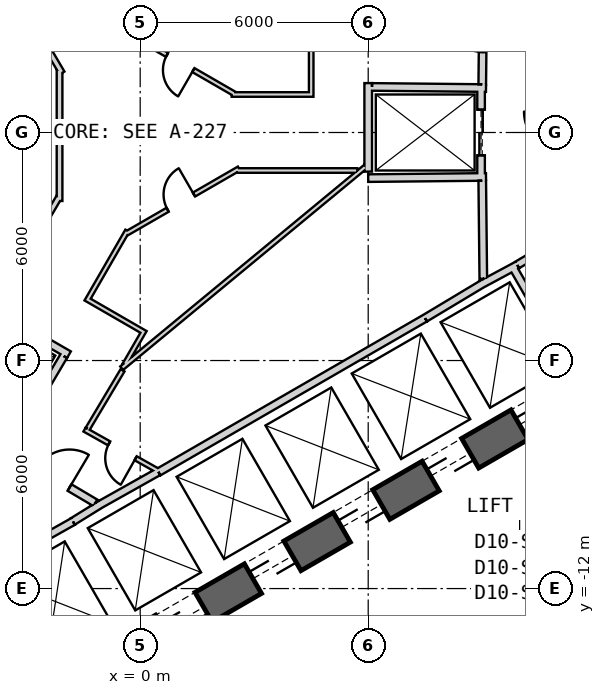
"""IFC4 building model, lengths in metres.
Left out: names, types, materials, properties, quantities, classifications, styles, units other than length and angle.
Written with IfcOpenShell. Run it as: python <this file> out.ifc"""

import sys

from ifc_helpers import new_model, si_unit, direction, frame, frame_2d, origin, place, context, subcontext, project, spatial, rectangle, extrude, element, fill, save


model = new_model("IFC4")
c1 = context("Model", 3, precision=1e-05, world=origin(), true_north=direction((0.0, 1.0)))
c2 = subcontext(c1, "Body", "Model", "MODEL_VIEW")
j1 = project(units=[si_unit("LENGTHUNIT", "METRE"), si_unit("PLANEANGLEUNIT", "RADIAN")], contexts=[c1])
p1 = place(None, origin())
s1 = spatial("IfcSite", under=j1, at=p1, CompositionType="ELEMENT")
p2 = place(p1, origin())
s2 = spatial("IfcBuilding", under=s1, at=p2, CompositionType="ELEMENT")
p3 = place(p2, frame((0.0, 0.0, 241.2)))
s3 = spatial("IfcBuildingStorey", under=s2, at=p3, CompositionType="ELEMENT", Elevation=241.2)
p4 = place(p3, frame((19.475, 2.208, 0.0), z_axis=(0.0, 0.0, 1.0), x_axis=(-0.866028369851, 0.499994862586, 0.0)))
e1 = element("IfcWall", 1, at=p4, inside=s3, PredefinedType="SHEAR", context=c2, shape_type="SweptSolid", body=[
    extrude(rectangle(XDim=31.523, YDim=0.9, at=frame_2d((15.762, 0.0))), origin(), (0.0, 0.0, 1.0), 4.0),
])
p5 = place(p4, frame((7.062, 0.0, 0.0)))
e2 = element("IfcOpeningElement", 2, at=p5, cuts=e1, PredefinedType="OPENING", context=c2, shape_type="SweptSolid", body=[
    extrude(rectangle(XDim=1.2, YDim=2.4, at=frame_2d((0.6, 1.2))), frame((0.0, 0.46, 0.0), z_axis=(0.0, -1.0, 0.0), x_axis=(1.0, 0.0, 0.0)), (0.0, 0.0, 1.0), 0.92),
])
p6 = place(p4, frame((3.612, 0.0, 0.0)))
e3 = element("IfcOpeningElement", 3, at=p6, cuts=e1, PredefinedType="OPENING", context=c2, shape_type="SweptSolid", body=[
    extrude(rectangle(XDim=1.2, YDim=2.4, at=frame_2d((0.6, 1.2))), frame((0.0, 0.46, 0.0), z_axis=(0.0, -1.0, 0.0), x_axis=(1.0, 0.0, 0.0)), (0.0, 0.0, 1.0), 0.92),
])
p7 = place(p4, frame((26.712, 0.0, 0.0)))
e4 = element("IfcOpeningElement", 4, at=p7, cuts=e1, PredefinedType="OPENING", context=c2, shape_type="SweptSolid", body=[
    extrude(rectangle(XDim=1.2, YDim=2.4, at=frame_2d((0.6, 1.2))), frame((0.0, 0.46, 0.0), z_axis=(0.0, -1.0, 0.0), x_axis=(1.0, 0.0, 0.0)), (0.0, 0.0, 1.0), 0.92),
])
p8 = place(p3, frame((-7.825, -17.97, 0.0), z_axis=(0.0, 0.0, 1.0), x_axis=(0.866028369851, 0.499994862586, 0.0)))
e5 = element("IfcWall", 5, at=p8, inside=s3, PredefinedType="SHEAR", context=c2, shape_type="SweptSolid", body=[
    extrude(rectangle(XDim=31.523, YDim=0.9, at=frame_2d((15.762, 0.0))), origin(), (0.0, 0.0, 1.0), 4.0),
])
p9 = place(p8, frame((7.062, 0.0, 0.0)))
e6 = element("IfcOpeningElement", 6, at=p9, cuts=e5, PredefinedType="OPENING", context=c2, shape_type="SweptSolid", body=[
    extrude(rectangle(XDim=1.2, YDim=2.4, at=frame_2d((0.6, 1.2))), frame((0.0, 0.46, 0.0), z_axis=(0.0, -1.0, 0.0), x_axis=(1.0, 0.0, 0.0)), (0.0, 0.0, 1.0), 0.92),
])
p10 = place(p8, frame((9.762, 0.0, 0.0)))
e7 = element("IfcOpeningElement", 7, at=p10, cuts=e5, PredefinedType="OPENING", context=c2, shape_type="SweptSolid", body=[
    extrude(rectangle(XDim=1.2, YDim=2.4, at=frame_2d((0.6, 1.2))), frame((0.0, 0.46, 0.0), z_axis=(0.0, -1.0, 0.0), x_axis=(1.0, 0.0, 0.0)), (0.0, 0.0, 1.0), 0.92),
])
p11 = place(p8, frame((12.462, 0.0, 0.0)))
e8 = element("IfcOpeningElement", 8, at=p11, cuts=e5, PredefinedType="OPENING", context=c2, shape_type="SweptSolid", body=[
    extrude(rectangle(XDim=1.2, YDim=2.4, at=frame_2d((0.6, 1.2))), frame((0.0, 0.46, 0.0), z_axis=(0.0, -1.0, 0.0), x_axis=(1.0, 0.0, 0.0)), (0.0, 0.0, 1.0), 0.92),
])
p12 = place(p8, frame((15.162, 0.0, 0.0)))
e9 = element("IfcOpeningElement", 9, at=p12, cuts=e5, PredefinedType="OPENING", context=c2, shape_type="SweptSolid", body=[
    extrude(rectangle(XDim=1.2, YDim=2.4, at=frame_2d((0.6, 1.2))), frame((0.0, 0.46, 0.0), z_axis=(0.0, -1.0, 0.0), x_axis=(1.0, 0.0, 0.0)), (0.0, 0.0, 1.0), 0.92),
])
p13 = place(p8, frame((17.862, 0.0, 0.0)))
e10 = element("IfcOpeningElement", 10, at=p13, cuts=e5, PredefinedType="OPENING", context=c2, shape_type="SweptSolid", body=[
    extrude(rectangle(XDim=1.2, YDim=2.4, at=frame_2d((0.6, 1.2))), frame((0.0, 0.46, 0.0), z_axis=(0.0, -1.0, 0.0), x_axis=(1.0, 0.0, 0.0)), (0.0, 0.0, 1.0), 0.92),
])
p14 = place(p8, frame((20.562, 0.0, 0.0)))
e11 = element("IfcOpeningElement", 11, at=p14, cuts=e5, PredefinedType="OPENING", context=c2, shape_type="SweptSolid", body=[
    extrude(rectangle(XDim=1.2, YDim=2.4, at=frame_2d((0.6, 1.2))), frame((0.0, 0.46, 0.0), z_axis=(0.0, -1.0, 0.0), x_axis=(1.0, 0.0, 0.0)), (0.0, 0.0, 1.0), 0.92),
])
p15 = place(p8, frame((26.712, 0.0, 0.0)))
e12 = element("IfcOpeningElement", 12, at=p15, cuts=e5, PredefinedType="OPENING", context=c2, shape_type="SweptSolid", body=[
    extrude(rectangle(XDim=1.2, YDim=2.4, at=frame_2d((0.6, 1.2))), frame((0.0, 0.46, 0.0), z_axis=(0.0, -1.0, 0.0), x_axis=(1.0, 0.0, 0.0)), (0.0, 0.0, 1.0), 0.92),
])
p16 = place(p8, frame((3.612, 0.0, 0.0)))
e13 = element("IfcOpeningElement", 13, at=p16, cuts=e5, PredefinedType="OPENING", context=c2, shape_type="SweptSolid", body=[
    extrude(rectangle(XDim=1.2, YDim=2.4, at=frame_2d((0.6, 1.2))), frame((0.0, 0.46, 0.0), z_axis=(0.0, -1.0, 0.0), x_axis=(1.0, 0.0, 0.0)), (0.0, 0.0, 1.0), 0.92),
])
p17 = place(p3, frame((0.483, -8.936, 0.0), z_axis=(0.0, 0.0, 1.0), x_axis=(0.866030989016, 0.499990325971, 0.0)))
e14 = element("IfcWall", 14, at=p17, inside=s3, PredefinedType="PLUMBINGWALL", context=c2, shape_type="SweptSolid", body=[
    extrude(rectangle(XDim=8.1, YDim=0.2, at=frame_2d((4.05, 0.0))), origin(), (0.0, 0.0, 1.0), 3.7),
])
p18 = place(p3, frame((9.795, -3.525, 0.0), z_axis=(0.0, 0.0, 1.0), x_axis=(0.499984717929, -0.866034226713, 0.0)))
e15 = element("IfcWall", 15, at=p18, inside=s3, PredefinedType="PLUMBINGWALL", context=c2, shape_type="SweptSolid", body=[
    extrude(rectangle(XDim=3.25, YDim=0.2, at=frame_2d((1.625, 0.0))), origin(), (0.0, 0.0, 1.0), 3.7),
])
p19 = place(p3, frame((8.974, -3.999, 0.0), z_axis=(0.0, 0.0, 1.0), x_axis=(0.880907015104, 0.473289373154, 0.0)))
e16 = element("IfcWall", 16, at=p19, inside=s3, PredefinedType="PLUMBINGWALL", context=c2, shape_type="SweptSolid", body=[
    extrude(rectangle(XDim=1.078, YDim=0.2, at=frame_2d((0.539, 0.0))), origin(), (0.0, 0.0, 1.0), 3.7),
])
p20 = place(p3, frame((7.497, -4.886, 0.0), z_axis=(0.0, 0.0, 1.0), x_axis=(0.857516281273, 0.51445682749, 0.0)))
e17 = element("IfcWall", 17, at=p20, inside=s3, PredefinedType="PLUMBINGWALL", context=c2, shape_type="SweptSolid", body=[
    extrude(rectangle(XDim=1.845, YDim=0.2, at=frame_2d((0.922, 0.0))), origin(), (0.0, 0.0, 1.0), 3.7),
])
p21 = place(p3, frame((-1.769, -10.237, 0.0), z_axis=(0.0, 0.0, 1.0), x_axis=(-0.871534483978, -0.490334215854, 0.0)))
e18 = element("IfcWall", 18, at=p21, inside=s3, PredefinedType="PLUMBINGWALL", context=c2, shape_type="SweptSolid", body=[
    extrude(rectangle(XDim=2.7, YDim=0.2, at=frame_2d((1.35, 0.0))), origin(), (0.0, 0.0, 1.0), 3.7),
])
p22 = place(p3, frame((-1.024, -9.771, 0.0), z_axis=(0.0, 0.0, 1.0), x_axis=(-0.850348075135, -0.526220629693, 0.0)))
e19 = element("IfcWall", 19, at=p22, inside=s3, PredefinedType="PLUMBINGWALL", context=c2, shape_type="SweptSolid", body=[
    extrude(rectangle(XDim=0.878, YDim=0.2, at=frame_2d((0.439, 0.0))), origin(), (0.0, 0.0, 1.0), 3.7),
])
p23 = place(p3, frame((-1.13, -9.832, 0.0), z_axis=(0.0, 0.0, 1.0), x_axis=(0.871988740738, 0.489525929882, 0.0)))
e20 = element("IfcWall", 20, at=p23, inside=s3, PredefinedType="PLUMBINGWALL", context=c2, shape_type="SweptSolid", body=[
    extrude(rectangle(XDim=1.845, YDim=0.2, at=frame_2d((0.922, 0.0))), origin(), (0.0, 0.0, 1.0), 3.7),
])
p24 = place(p3, frame((8.97, 1.2, 0.0), z_axis=(0.0, 0.0, 1.0), x_axis=(0.0, -1.0, 0.0)))
e21 = element("IfcWall", 21, at=p24, inside=s3, PredefinedType="PLUMBINGWALL", context=c2, shape_type="SweptSolid", body=[
    extrude(rectangle(XDim=2.4, YDim=0.2, at=frame_2d((1.2, 0.0))), origin(), (0.0, 0.0, 1.0), 3.7),
])
p25 = place(p24, frame((0.6, 0.0, 0.0)))
e22 = element("IfcOpeningElement", 22, at=p25, cuts=e21, PredefinedType="OPENING", context=c2, shape_type="SweptSolid", body=[
    extrude(rectangle(XDim=1.2, YDim=2.4, at=frame_2d((0.6, 1.2))), frame((0.0, 0.11, 0.0), z_axis=(0.0, -1.0, 0.0), x_axis=(1.0, 0.0, 0.0)), (0.0, 0.0, 1.0), 0.22),
])
p26 = place(p3, frame((9.1, -1.169, 0.0), z_axis=(0.0, 0.0, 1.0), x_axis=(-0.999949988, -0.010001074852, 0.0)))
e23 = element("IfcWall", 23, at=p26, inside=s3, PredefinedType="PLUMBINGWALL", context=c2, shape_type="SweptSolid", body=[
    extrude(rectangle(XDim=3.1, YDim=0.2, at=frame_2d((1.55, 0.0))), origin(), (0.0, 0.0, 1.0), 3.7),
])
p27 = place(p3, frame((6.0, -1.03, 0.0), z_axis=(0.0, 0.0, 1.0), x_axis=(0.0, 1.0, 0.0)))
e24 = element("IfcWall", 24, at=p27, inside=s3, PredefinedType="PLUMBINGWALL", context=c2, shape_type="SweptSolid", body=[
    extrude(rectangle(XDim=2.33, YDim=0.2, at=frame_2d((1.165, 0.0))), origin(), (0.0, 0.0, 1.0), 3.7),
])
p28 = place(p3, frame((9.1, 1.169, 0.0), z_axis=(0.0, 0.0, 1.0), x_axis=(-0.99994990606, 0.010009264196, 0.0)))
e25 = element("IfcWall", 25, at=p28, inside=s3, PredefinedType="PLUMBINGWALL", context=c2, shape_type="SweptSolid", body=[
    extrude(rectangle(XDim=3.0, YDim=0.2, at=frame_2d((1.5, 0.0))), origin(), (0.0, 0.0, 1.0), 3.7),
])
p29 = place(p3, frame((-3.957, -4.644, 0.0), z_axis=(0.0, 0.0, 1.0), x_axis=(0.865991127953, -0.500059362782, 0.0)))
e26 = element("IfcWall", 26, at=p29, inside=s3, PredefinedType="PLUMBINGWALL", context=c2, shape_type="SweptSolid", body=[
    extrude(rectangle(XDim=2.405, YDim=0.2, at=frame_2d((1.202, 0.0))), origin(), (0.0, 0.0, 1.0), 3.7),
])
p30 = place(p3, frame((-2.012, -5.882, 0.0), z_axis=(0.0, 0.0, 1.0), x_axis=(-0.508619639323, -0.860991325447, 0.0)))
e27 = element("IfcWall", 27, at=p30, inside=s3, PredefinedType="PLUMBINGWALL", context=c2, shape_type="SweptSolid", body=[
    extrude(rectangle(XDim=3.0, YDim=0.2, at=frame_2d((1.5, 0.0))), origin(), (0.0, 0.0, 1.0), 3.7),
])
p31 = place(p3, frame((12.245, -2.109, 0.0), z_axis=(0.0, 0.0, 1.0), x_axis=(-0.860414880418, -0.509594185166, 0.0)))
e28 = element("IfcWall", 28, at=p31, inside=s3, PredefinedType="PARTITIONING", context=c2, shape_type="SweptSolid", body=[
    extrude(rectangle(XDim=2.7, YDim=0.2, at=frame_2d((1.35, 0.0))), origin(), (0.0, 0.0, 1.0), 3.7),
])
p32 = place(p3, frame((9.029, -3.851, 0.0), z_axis=(0.0, 0.0, 1.0), x_axis=(-0.010784614026, 0.999941844359, 0.0)))
e29 = element("IfcWall", 29, at=p32, inside=s3, PredefinedType="PARTITIONING", context=c2, shape_type="SweptSolid", body=[
    extrude(rectangle(XDim=2.581, YDim=0.2, at=frame_2d((1.291, 0.0))), origin(), (0.0, 0.0, 1.0), 3.7),
])
p33 = place(p3, frame((9.001, 1.27, 0.0), z_axis=(0.0, 0.0, 1.0), x_axis=(0.010723968736, 0.999942496594, 0.0)))
e30 = element("IfcWall", 30, at=p33, inside=s3, PredefinedType="PARTITIONING", context=c2, shape_type="SweptSolid", body=[
    extrude(rectangle(XDim=2.709, YDim=0.2, at=frame_2d((1.354, 0.0))), origin(), (0.0, 0.0, 1.0), 3.7),
])
p34 = place(p33, frame((0.848, 0.0, 0.0)))
e31 = element("IfcOpeningElement", 31, at=p34, cuts=e30, PredefinedType="OPENING", context=c2, shape_type="SweptSolid", body=[
    extrude(rectangle(XDim=1.0, YDim=2.1, at=frame_2d((0.5, 1.05))), frame((0.0, 0.11, 0.0), z_axis=(0.0, -1.0, 0.0), x_axis=(1.0, 0.0, 0.0)), (0.0, 0.0, 1.0), 0.22),
])
p35 = place(p3, frame((-3.401, -8.43, 0.0), z_axis=(0.0, 0.0, 1.0), x_axis=(0.860598681535, -0.509283721849, 0.0)))
e32 = element("IfcWall", 32, at=p35, inside=s3, PredefinedType="PARTITIONING", context=c2, shape_type="SweptSolid", body=[
    extrude(rectangle(XDim=2.581, YDim=0.2, at=frame_2d((1.291, 0.0))), origin(), (0.0, 0.0, 1.0), 3.7),
])
p36 = place(p35, frame((0.791, 0.0, 0.0)))
e33 = element("IfcOpeningElement", 33, at=p36, cuts=e32, PredefinedType="OPENING", context=c2, shape_type="SweptSolid", body=[
    extrude(rectangle(XDim=1.0, YDim=2.1, at=frame_2d((0.5, 1.05))), frame((0.0, 0.11, 0.0), z_axis=(0.0, -1.0, 0.0), x_axis=(1.0, 0.0, 0.0)), (0.0, 0.0, 1.0), 0.22),
])
p37 = place(p3, frame((-2.057, 1.565, 0.0), z_axis=(0.0, 0.0, 1.0), x_axis=(-0.507299271879, 0.861769951176, 0.0)))
e34 = element("IfcWall", 34, at=p37, inside=s3, PredefinedType="PLUMBINGWALL", context=c2, shape_type="SweptSolid", body=[
    extrude(rectangle(XDim=3.516, YDim=0.15, at=frame_2d((1.758, 0.0))), origin(), (0.0, 0.0, 1.0), 3.7),
])
p38 = place(p37, frame((1.422, 0.0, 0.0)))
e35 = element("IfcOpeningElement", 35, at=p38, cuts=e34, PredefinedType="OPENING", context=c2, shape_type="SweptSolid", body=[
    extrude(rectangle(XDim=0.8, YDim=2.1, at=frame_2d((0.4, 1.05))), frame((0.0, 0.085, 0.0), z_axis=(0.0, -1.0, 0.0), x_axis=(1.0, 0.0, 0.0)), (0.0, 0.0, 1.0), 0.17),
])
p39 = place(p3, frame((-2.122, -1.802, 0.0), z_axis=(0.0, 0.0, 1.0), x_axis=(0.0, 1.0, 0.0)))
e36 = element("IfcWall", 36, at=p39, inside=s3, PredefinedType="PLUMBINGWALL", context=c2, shape_type="SweptSolid", body=[
    extrude(rectangle(XDim=3.454, YDim=0.15, at=frame_2d((1.727, 0.0))), origin(), (0.0, 0.0, 1.0), 3.7),
])
p40 = place(p3, frame((-3.841, -4.595, 0.0), z_axis=(0.0, 0.0, 1.0), x_axis=(0.507318157939, 0.861758833216, 0.0)))
e37 = element("IfcWall", 37, at=p40, inside=s3, PredefinedType="PLUMBINGWALL", context=c2, shape_type="SweptSolid", body=[
    extrude(rectangle(XDim=3.365, YDim=0.15, at=frame_2d((1.682, 0.0))), origin(), (0.0, 0.0, 1.0), 3.7),
])
p41 = place(p3, frame((5.936, -0.894, 0.0), z_axis=(0.0, 0.0, 1.0), x_axis=(-0.770832870475, -0.637037428881, 0.0)))
e38 = element("IfcWall", 38, at=p41, inside=s3, PredefinedType="PARTITIONING", context=c2, shape_type="SweptSolid", body=[
    extrude(rectangle(XDim=8.332, YDim=0.12, at=frame_2d((4.166, 0.0))), origin(), (0.0, 0.0, 1.0), 3.7),
])
p42 = place(p3, frame((-0.411, -6.111, 0.0), z_axis=(0.0, 0.0, 1.0), x_axis=(0.49986229611, 0.866104892567, 0.0)))
e39 = element("IfcWall", 39, at=p42, inside=s3, PredefinedType="PARTITIONING", context=c2, shape_type="SweptSolid", body=[
    extrude(rectangle(XDim=1.058, YDim=0.12, at=frame_2d((0.529, 0.0))), origin(), (0.0, 0.0, 1.0), 3.7),
])
p43 = place(p3, frame((-1.436, -4.367, 0.0), z_axis=(0.0, 0.0, 1.0), x_axis=(0.866087547558, -0.499892348375, 0.0)))
e40 = element("IfcWall", 40, at=p43, inside=s3, PredefinedType="PARTITIONING", context=c2, shape_type="SweptSolid", body=[
    extrude(rectangle(XDim=1.7, YDim=0.12, at=frame_2d((0.85, 0.0))), origin(), (0.0, 0.0, 1.0), 3.7),
])
p44 = place(p3, frame((-0.338, -2.585, 0.0), z_axis=(0.0, 0.0, 1.0), x_axis=(-0.50002743572, -0.866009563185, 0.0)))
e41 = element("IfcWall", 41, at=p44, inside=s3, PredefinedType="PARTITIONING", context=c2, shape_type="SweptSolid", body=[
    extrude(rectangle(XDim=2.033, YDim=0.12, at=frame_2d((1.016, 0.0))), origin(), (0.0, 0.0, 1.0), 3.7),
])
p45 = place(p3, frame((2.602, -0.948, 0.0), z_axis=(0.0, 0.0, 1.0), x_axis=(-0.86601279846, -0.500021832428, 0.0)))
e42 = element("IfcWall", 42, at=p45, inside=s3, PredefinedType="PARTITIONING", context=c2, shape_type="SweptSolid", body=[
    extrude(rectangle(XDim=3.435, YDim=0.12, at=frame_2d((1.718, 0.0))), origin(), (0.0, 0.0, 1.0), 3.7),
])
p46 = place(p45, frame((1.37, 0.0, 0.0)))
e43 = element("IfcOpeningElement", 43, at=p46, cuts=e42, PredefinedType="OPENING", context=c2, shape_type="SweptSolid", body=[
    extrude(rectangle(XDim=0.8, YDim=2.1, at=frame_2d((0.4, 1.05))), frame((0.0, 0.07, 0.0), z_axis=(0.0, -1.0, 0.0), x_axis=(1.0, 0.0, 0.0)), (0.0, 0.0, 1.0), 0.14),
])
p47 = place(p3, frame((5.713, -1.0, 0.0), z_axis=(0.0, 0.0, 1.0), x_axis=(-1.0, 0.0, 0.0)))
e44 = element("IfcWall", 44, at=p47, inside=s3, PredefinedType="PARTITIONING", context=c2, shape_type="SweptSolid", body=[
    extrude(rectangle(XDim=3.183, YDim=0.12, at=frame_2d((1.591, 0.0))), origin(), (0.0, 0.0, 1.0), 3.7),
])
p48 = place(p3, frame((-1.464, -7.816, 0.0), z_axis=(0.0, 0.0, 1.0), x_axis=(0.871880202732, -0.489719217597, 0.0)))
e45 = element("IfcWall", 45, at=p48, inside=s3, PredefinedType="PARTITIONING", context=c2, shape_type="SweptSolid", body=[
    extrude(rectangle(XDim=2.224, YDim=0.12, at=frame_2d((1.112, 0.0))), origin(), (0.0, 0.0, 1.0), 3.7),
])
p49 = place(p48, frame((0.742, 0.0, 0.0)))
e46 = element("IfcOpeningElement", 46, at=p49, cuts=e45, PredefinedType="OPENING", context=c2, shape_type="SweptSolid", body=[
    extrude(rectangle(XDim=0.8, YDim=2.1, at=frame_2d((0.4, 1.05))), frame((0.0, 0.07, 0.0), z_axis=(0.0, -1.0, 0.0), x_axis=(1.0, 0.0, 0.0)), (0.0, 0.0, 1.0), 0.14),
])
p50 = place(p3, frame((-0.463, -6.257, 0.0), z_axis=(0.0, 0.0, 1.0), x_axis=(-0.512528878122, -0.858669988466, 0.0)))
e47 = element("IfcWall", 47, at=p50, inside=s3, PredefinedType="PARTITIONING", context=c2, shape_type="SweptSolid", body=[
    extrude(rectangle(XDim=1.79, YDim=0.12, at=frame_2d((0.895, 0.0))), origin(), (0.0, 0.0, 1.0), 3.7),
])
p51 = place(p3, frame((4.5, 0.94, 0.0), z_axis=(0.0, 0.0, 1.0), x_axis=(0.0, 1.0, 0.0)))
e48 = element("IfcWall", 48, at=p51, inside=s3, PredefinedType="PARTITIONING", context=c2, shape_type="SweptSolid", body=[
    extrude(rectangle(XDim=1.7, YDim=0.12, at=frame_2d((0.85, 0.0))), origin(), (0.0, 0.0, 1.0), 3.7),
])
p52 = place(p3, frame((2.407, 1.0, 0.0), z_axis=(0.0, 0.0, 1.0), x_axis=(1.0, 0.0, 0.0)))
e49 = element("IfcWall", 49, at=p52, inside=s3, PredefinedType="PARTITIONING", context=c2, shape_type="SweptSolid", body=[
    extrude(rectangle(XDim=2.032, YDim=0.12, at=frame_2d((1.016, 0.0))), origin(), (0.0, 0.0, 1.0), 3.7),
])
p53 = place(p3, frame((-0.48, 2.727, 0.0), z_axis=(0.0, 0.0, 1.0), x_axis=(0.86601279846, -0.500021832428, 0.0)))
e50 = element("IfcWall", 50, at=p53, inside=s3, PredefinedType="PARTITIONING", context=c2, shape_type="SweptSolid", body=[
    extrude(rectangle(XDim=3.435, YDim=0.12, at=frame_2d((1.718, 0.0))), origin(), (0.0, 0.0, 1.0), 3.7),
])
p54 = place(p53, frame((1.37, 0.0, 0.0)))
e51 = element("IfcOpeningElement", 51, at=p54, cuts=e50, PredefinedType="OPENING", context=c2, shape_type="SweptSolid", body=[
    extrude(rectangle(XDim=0.8, YDim=2.1, at=frame_2d((0.4, 1.05))), frame((0.0, 0.07, 0.0), z_axis=(0.0, -1.0, 0.0), x_axis=(1.0, 0.0, 0.0)), (0.0, 0.0, 1.0), 0.14),
])
p55 = place(p25, origin())
e52 = element("IfcDoor", 52, at=p55, inside=s3, OperationType="SLIDING_TO_LEFT", PredefinedType="USERDEFINED", context=c2, shape_type="SweptSolid", body=[
    extrude(rectangle(XDim=1.2, YDim=2.4, at=frame_2d((0.6, 1.2))), frame((0.0, 0.025, 0.0), z_axis=(0.0, -1.0, 0.0), x_axis=(1.0, 0.0, 0.0)), (0.0, 0.0, 1.0), 0.05),
])
fill(e22, e52)
p56 = place(p36, origin())
e53 = element("IfcDoor", 53, at=p56, inside=s3, OperationType="SINGLE_SWING_RIGHT", PredefinedType="USERDEFINED", context=c2, shape_type="SweptSolid", body=[
    extrude(rectangle(XDim=1.0, YDim=2.1, at=frame_2d((0.5, 1.05))), frame((0.0, 0.025, 0.0), z_axis=(0.0, -1.0, 0.0), x_axis=(1.0, 0.0, 0.0)), (0.0, 0.0, 1.0), 0.05),
])
fill(e33, e53)
p57 = place(p46, origin())
e54 = element("IfcDoor", 54, at=p57, inside=s3, OperationType="SINGLE_SWING_RIGHT", PredefinedType="USERDEFINED", context=c2, shape_type="SweptSolid", body=[
    extrude(rectangle(XDim=0.8, YDim=2.1, at=frame_2d((0.4, 1.05))), frame((0.0, 0.025, 0.0), z_axis=(0.0, -1.0, 0.0), x_axis=(1.0, 0.0, 0.0)), (0.0, 0.0, 1.0), 0.05),
])
fill(e43, e54)
p58 = place(p49, origin())
e55 = element("IfcDoor", 55, at=p58, inside=s3, OperationType="SINGLE_SWING_LEFT", PredefinedType="USERDEFINED", context=c2, shape_type="SweptSolid", body=[
    extrude(rectangle(XDim=0.8, YDim=2.1, at=frame_2d((0.4, 1.05))), frame((0.0, 0.025, 0.0), z_axis=(0.0, -1.0, 0.0), x_axis=(1.0, 0.0, 0.0)), (0.0, 0.0, 1.0), 0.05),
])
fill(e46, e55)
p59 = place(p54, origin())
e56 = element("IfcDoor", 56, at=p59, inside=s3, OperationType="SINGLE_SWING_LEFT", PredefinedType="USERDEFINED", context=c2, shape_type="SweptSolid", body=[
    extrude(rectangle(XDim=0.8, YDim=2.1, at=frame_2d((0.4, 1.05))), frame((0.0, 0.025, 0.0), z_axis=(0.0, -1.0, 0.0), x_axis=(1.0, 0.0, 0.0)), (0.0, 0.0, 1.0), 0.05),
])
fill(e51, e56)
p60 = place(p10, origin())
e57 = element("IfcDoor", 57, at=p60, inside=s3, OperationType="SLIDING_TO_LEFT", PredefinedType="USERDEFINED", context=c2, shape_type="SweptSolid", body=[
    extrude(rectangle(XDim=1.2, YDim=2.4, at=frame_2d((0.6, 1.2))), frame((0.0, 0.025, 0.0), z_axis=(0.0, -1.0, 0.0), x_axis=(1.0, 0.0, 0.0)), (0.0, 0.0, 1.0), 0.05),
])
fill(e7, e57)
p61 = place(p11, origin())
e58 = element("IfcDoor", 58, at=p61, inside=s3, OperationType="SLIDING_TO_LEFT", PredefinedType="USERDEFINED", context=c2, shape_type="SweptSolid", body=[
    extrude(rectangle(XDim=1.2, YDim=2.4, at=frame_2d((0.6, 1.2))), frame((0.0, 0.025, 0.0), z_axis=(0.0, -1.0, 0.0), x_axis=(1.0, 0.0, 0.0)), (0.0, 0.0, 1.0), 0.05),
])
fill(e8, e58)
p62 = place(p12, origin())
e59 = element("IfcDoor", 59, at=p62, inside=s3, OperationType="SLIDING_TO_LEFT", PredefinedType="USERDEFINED", context=c2, shape_type="SweptSolid", body=[
    extrude(rectangle(XDim=1.2, YDim=2.4, at=frame_2d((0.6, 1.2))), frame((0.0, 0.025, 0.0), z_axis=(0.0, -1.0, 0.0), x_axis=(1.0, 0.0, 0.0)), (0.0, 0.0, 1.0), 0.05),
])
fill(e9, e59)
p63 = place(p13, origin())
e60 = element("IfcDoor", 60, at=p63, inside=s3, OperationType="SLIDING_TO_LEFT", PredefinedType="USERDEFINED", context=c2, shape_type="SweptSolid", body=[
    extrude(rectangle(XDim=1.2, YDim=2.4, at=frame_2d((0.6, 1.2))), frame((0.0, 0.025, 0.0), z_axis=(0.0, -1.0, 0.0), x_axis=(1.0, 0.0, 0.0)), (0.0, 0.0, 1.0), 0.05),
])
fill(e10, e60)
p64 = place(p14, origin())
e61 = element("IfcDoor", 61, at=p64, inside=s3, OperationType="SLIDING_TO_LEFT", PredefinedType="USERDEFINED", context=c2, shape_type="SweptSolid", body=[
    extrude(rectangle(XDim=1.2, YDim=2.4, at=frame_2d((0.6, 1.2))), frame((0.0, 0.025, 0.0), z_axis=(0.0, -1.0, 0.0), x_axis=(1.0, 0.0, 0.0)), (0.0, 0.0, 1.0), 0.05),
])
fill(e11, e61)
save(model, sys.argv[1])
